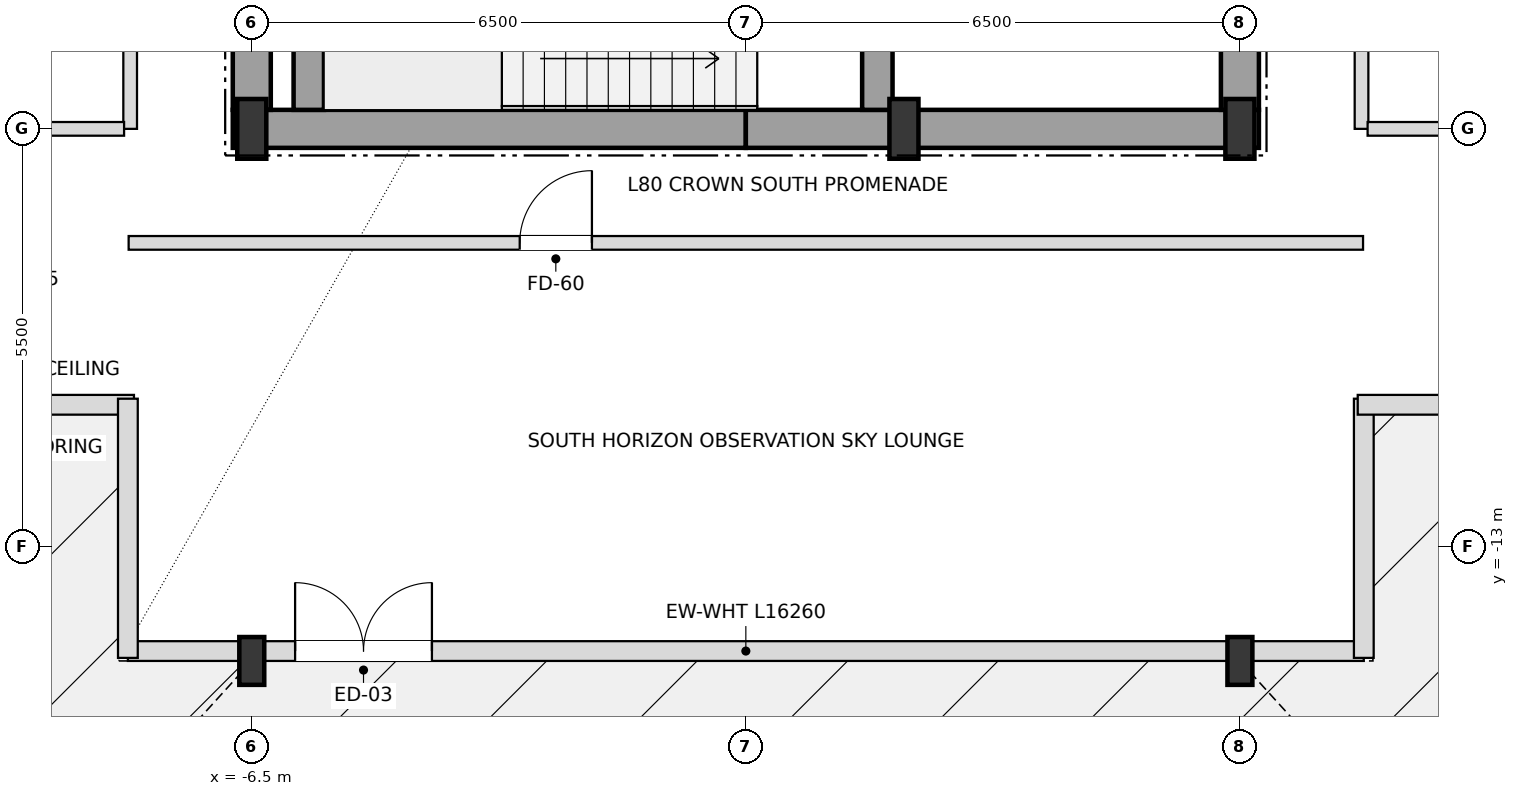
"""IFC4 building model, lengths in metres.
Left out: names, types, materials, properties, quantities, classifications, styles, units other than length and angle.
Written with IfcOpenShell. Run it as: python <this file> out.ifc"""

import sys

from ifc_helpers import new_model, si_unit, direction, frame, frame_2d, origin, origin_2d, place, context, subcontext, project, spatial, rectangle, i_section, extrude, element, fill, save


model = new_model("IFC4")
c1 = context("Model", 3, precision=1e-05, world=origin(), true_north=direction((0.0, 1.0)))
c2 = subcontext(c1, "Body", "Model", "MODEL_VIEW")
j1 = project(units=[si_unit("LENGTHUNIT", "METRE"), si_unit("PLANEANGLEUNIT", "RADIAN")], contexts=[c1])
p1 = place(None, origin())
s1 = spatial("IfcSite", under=j1, at=p1, CompositionType="ELEMENT")
p2 = place(p1, origin())
s2 = spatial("IfcBuilding", under=s1, at=p2, CompositionType="ELEMENT")
p3 = place(p2, frame((0.0, 0.0, 305.1)))
s3 = spatial("IfcBuildingStorey", under=s2, at=p3, CompositionType="ELEMENT", Elevation=305.1)
for number, where, z_axis, x_axis in (
    (1, (-6.5, -7.5, 0.0), (0.0, 0.0, 1.0), (1.0, 0.0, 0.0)),
    (2, (2.08, -7.5, 0.0), (0.0, 0.0, 1.0), (1.0, 0.0, 0.0)),
    (3, (6.5, -7.5, 0.0), (0.0, 0.0, 1.0), (1.0, 0.0, 0.0)),
):
    element("IfcColumn", number, at=place(p3, frame(where, z_axis=z_axis, x_axis=x_axis)), inside=s3, PredefinedType="COLUMN", context=c2, shape_type="SweptSolid", body=[
        extrude(i_section(OverallWidth=0.382, OverallDepth=0.786, WebThickness=0.02, FlangeThickness=0.033, at=origin_2d()), origin(), (0.0, 0.0, 1.0), 4.8),
    ])
for number, where, z_axis, x_axis in (
    (4, (-6.5, -14.5, 0.0), (0.0, 0.0, 1.0), (1.0, 0.0, 0.0)),
    (5, (6.5, -14.5, 0.0), (0.0, 0.0, 1.0), (1.0, 0.0, 0.0)),
):
    element("IfcColumn", number, at=place(p3, frame(where, z_axis=z_axis, x_axis=x_axis)), inside=s3, PredefinedType="COLUMN", context=c2, shape_type="SweptSolid", body=[
        extrude(i_section(OverallWidth=0.328, OverallDepth=0.629, WebThickness=0.014, FlangeThickness=0.021, at=origin_2d()), origin(), (0.0, 0.0, 1.0), 4.8),
    ])
p4 = place(p3, frame((-8.13, -14.37, 0.0), z_axis=(0.0, 0.0, 1.0), x_axis=(1.0, 0.0, 0.0)))
e6 = element("IfcWall", 6, at=p4, inside=s3, PredefinedType="SOLIDWALL", context=c2, shape_type="SweptSolid", body=[
    extrude(rectangle(XDim=16.26, YDim=0.26, at=frame_2d((8.13, 0.0))), origin(), (0.0, 0.0, 1.0), 4.218),
])
p5 = place(p4, frame((2.2, 0.0, 0.0)))
e7 = element("IfcOpeningElement", 7, at=p5, cuts=e6, PredefinedType="OPENING", context=c2, shape_type="SweptSolid", body=[
    extrude(rectangle(XDim=1.8, YDim=2.3, at=frame_2d((0.9, 1.15))), frame((0.0, 0.14, 0.0), z_axis=(0.0, -1.0, 0.0), x_axis=(1.0, 0.0, 0.0)), (0.0, 0.0, 1.0), 0.28),
])
p6 = place(p3, frame((-11.46, -11.13, 0.0), z_axis=(0.0, 0.0, 1.0), x_axis=(1.0, 0.0, 0.0)))
e8 = element("IfcWall", 8, at=p6, inside=s3, PredefinedType="SOLIDWALL", context=c2, shape_type="SweptSolid", body=[
    extrude(rectangle(XDim=3.41, YDim=0.26, at=frame_2d((1.705, 0.0))), origin(), (0.0, 0.0, 1.0), 4.55),
])
for number, where, z_axis, x_axis in (
    (9, (-8.13, -11.05, 0.0), (0.0, 0.0, 1.0), (0.0, -1.0, 0.0)),
    (10, (8.13, -14.46, 0.0), (0.0, 0.0, 1.0), (0.0, 1.0, 0.0)),
):
    element("IfcWall", number, at=place(p3, frame(where, z_axis=z_axis, x_axis=x_axis)), inside=s3, PredefinedType="SOLIDWALL", context=c2, shape_type="SweptSolid", body=[
        extrude(rectangle(XDim=3.41, YDim=0.26, at=frame_2d((1.705, 0.0))), origin(), (0.0, 0.0, 1.0), 4.218),
    ])
p7 = place(p3, frame((8.05, -11.13, 0.0), z_axis=(0.0, 0.0, 1.0), x_axis=(1.0, 0.0, 0.0)))
e11 = element("IfcWall", 11, at=p7, inside=s3, PredefinedType="SOLIDWALL", context=c2, shape_type="SweptSolid", body=[
    extrude(rectangle(XDim=3.41, YDim=0.26, at=frame_2d((1.705, 0.0))), origin(), (0.0, 0.0, 1.0), 4.55),
])
for number, where, z_axis, x_axis in (
    (12, (-6.75, -7.5, 0.0), (0.0, 0.0, 1.0), (1.0, 0.0, 0.0)),
    (13, (0.0, -7.5, 0.0), (0.0, 0.0, 1.0), (1.0, 0.0, 0.0)),
):
    element("IfcWall", number, at=place(p3, frame(where, z_axis=z_axis, x_axis=x_axis)), inside=s3, PredefinedType="SHEAR", context=c2, shape_type="SweptSolid", body=[
        extrude(rectangle(XDim=6.75, YDim=0.5, at=frame_2d((3.375, 0.0))), origin(), (0.0, 0.0, 1.0), 4.55),
    ])
p8 = place(p3, frame((-6.5, -7.25, 0.0), z_axis=(0.0, 0.0, 1.0), x_axis=(0.0, 1.0, 0.0)))
e14 = element("IfcWall", 14, at=p8, inside=s3, PredefinedType="SHEAR", context=c2, shape_type="SweptSolid", body=[
    extrude(rectangle(XDim=3.55, YDim=0.5, at=frame_2d((1.775, 0.0))), origin(), (0.0, 0.0, 1.0), 4.55),
])
p9 = place(p3, frame((6.5, -7.25, 0.0), z_axis=(0.0, 0.0, 1.0), x_axis=(0.0, 1.0, 0.0)))
e15 = element("IfcWall", 15, at=p9, inside=s3, PredefinedType="SHEAR", context=c2, shape_type="SweptSolid", body=[
    extrude(rectangle(XDim=5.75, YDim=0.5, at=frame_2d((2.875, 0.0))), origin(), (0.0, 0.0, 1.0), 4.55),
])
p10 = place(p9, frame((0.85, 0.0, 0.0)))
e16 = element("IfcOpeningElement", 16, at=p10, cuts=e15, PredefinedType="OPENING", context=c2, shape_type="SweptSolid", body=[
    extrude(rectangle(XDim=1.05, YDim=2.15, at=frame_2d((0.525, 1.075))), frame((0.0, 0.26, 0.0), z_axis=(0.0, -1.0, 0.0), x_axis=(1.0, 0.0, 0.0)), (0.0, 0.0, 1.0), 0.52),
])
p11 = place(p3, frame((-5.75, -7.25, 0.0), z_axis=(0.0, 0.0, 1.0), x_axis=(0.0, 1.0, 0.0)))
e17 = element("IfcWall", 17, at=p11, inside=s3, PredefinedType="SHEAR", context=c2, shape_type="SweptSolid", body=[
    extrude(rectangle(XDim=2.9, YDim=0.4, at=frame_2d((1.45, 0.0))), origin(), (0.0, 0.0, 1.0), 4.55),
])
p12 = place(p3, frame((1.73, -7.25, 0.0), z_axis=(0.0, 0.0, 1.0), x_axis=(0.0, 1.0, 0.0)))
e18 = element("IfcWall", 18, at=p12, inside=s3, PredefinedType="SHEAR", context=c2, shape_type="SweptSolid", body=[
    extrude(rectangle(XDim=3.3, YDim=0.4, at=frame_2d((1.65, 0.0))), origin(), (0.0, 0.0, 1.0), 4.55),
])
p13 = place(p12, frame((0.9, 0.0, 0.0)))
e19 = element("IfcOpeningElement", 19, at=p13, cuts=e18, PredefinedType="OPENING", context=c2, shape_type="SweptSolid", body=[
    extrude(rectangle(XDim=1.05, YDim=2.15, at=frame_2d((0.525, 1.075))), frame((0.0, 0.21, 0.0), z_axis=(0.0, -1.0, 0.0), x_axis=(1.0, 0.0, 0.0)), (0.0, 0.0, 1.0), 0.42),
])
p14 = place(p3, frame((-8.1, -7.5, 0.0), z_axis=(0.0, 0.0, 1.0), x_axis=(0.0, 1.0, 0.0)))
e20 = element("IfcWall", 20, at=p14, inside=s3, PredefinedType="PARTITIONING", context=c2, shape_type="SweptSolid", body=[
    extrude(rectangle(XDim=15.0, YDim=0.18, at=frame_2d((7.5, 0.0))), origin(), (0.0, 0.0, 1.0), 4.55),
])
p15 = place(p14, frame((4.525, 0.0, 0.0)))
e21 = element("IfcOpeningElement", 21, at=p15, cuts=e20, PredefinedType="OPENING", context=c2, shape_type="SweptSolid", body=[
    extrude(rectangle(XDim=0.95, YDim=2.15, at=frame_2d((0.475, 1.075))), frame((0.0, 0.1, 0.0), z_axis=(0.0, -1.0, 0.0), x_axis=(1.0, 0.0, 0.0)), (0.0, 0.0, 1.0), 0.2),
])
p16 = place(p3, frame((8.1, -7.5, 0.0), z_axis=(0.0, 0.0, 1.0), x_axis=(0.0, 1.0, 0.0)))
e22 = element("IfcWall", 22, at=p16, inside=s3, PredefinedType="PARTITIONING", context=c2, shape_type="SweptSolid", body=[
    extrude(rectangle(XDim=15.0, YDim=0.18, at=frame_2d((7.5, 0.0))), origin(), (0.0, 0.0, 1.0), 4.55),
])
p17 = place(p16, frame((4.525, 0.0, 0.0)))
e23 = element("IfcOpeningElement", 23, at=p17, cuts=e22, PredefinedType="OPENING", context=c2, shape_type="SweptSolid", body=[
    extrude(rectangle(XDim=0.95, YDim=2.15, at=frame_2d((0.475, 1.075))), frame((0.0, 0.1, 0.0), z_axis=(0.0, -1.0, 0.0), x_axis=(1.0, 0.0, 0.0)), (0.0, 0.0, 1.0), 0.2),
])
p18 = place(p16, frame((11.825, 0.0, 0.0)))
e24 = element("IfcOpeningElement", 24, at=p18, cuts=e22, PredefinedType="OPENING", context=c2, shape_type="SweptSolid", body=[
    extrude(rectangle(XDim=0.95, YDim=2.15, at=frame_2d((0.475, 1.075))), frame((0.0, 0.1, 0.0), z_axis=(0.0, -1.0, 0.0), x_axis=(1.0, 0.0, 0.0)), (0.0, 0.0, 1.0), 0.2),
])
p19 = place(p3, frame((-8.12, -9.0, 0.0), z_axis=(0.0, 0.0, 1.0), x_axis=(1.0, 0.0, 0.0)))
e25 = element("IfcWall", 25, at=p19, inside=s3, PredefinedType="PARTITIONING", context=c2, shape_type="SweptSolid", body=[
    extrude(rectangle(XDim=16.24, YDim=0.18, at=frame_2d((8.12, 0.0))), origin(), (0.0, 0.0, 1.0), 4.55),
])
p20 = place(p19, frame((5.145, 0.0, 0.0)))
e26 = element("IfcOpeningElement", 26, at=p20, cuts=e25, PredefinedType="OPENING", context=c2, shape_type="SweptSolid", body=[
    extrude(rectangle(XDim=0.95, YDim=2.15, at=frame_2d((0.475, 1.075))), frame((0.0, 0.1, 0.0), z_axis=(0.0, -1.0, 0.0), x_axis=(1.0, 0.0, 0.0)), (0.0, 0.0, 1.0), 0.2),
])
for number, where, z_axis, x_axis in (
    (27, (-11.25, -7.5, 0.0), (0.0, 0.0, 1.0), (1.0, 0.0, 0.0)),
    (28, (8.18, -7.5, 0.0), (0.0, 0.0, 1.0), (1.0, 0.0, 0.0)),
):
    element("IfcWall", number, at=place(p3, frame(where, z_axis=z_axis, x_axis=x_axis)), inside=s3, PredefinedType="PARTITIONING", context=c2, shape_type="SweptSolid", body=[
        extrude(rectangle(XDim=3.07, YDim=0.18, at=frame_2d((1.535, 0.0))), origin(), (0.0, 0.0, 1.0), 4.218),
    ])
p21 = place(p5, origin())
e29 = element("IfcDoor", 29, at=p21, inside=s3, OperationType="DOUBLE_DOOR_SINGLE_SWING", PredefinedType="DOOR", context=c2, shape_type="SweptSolid", body=[
    extrude(rectangle(XDim=1.8, YDim=2.3, at=frame_2d((0.9, 1.15))), frame((0.0, 0.025, 0.0), z_axis=(0.0, -1.0, 0.0), x_axis=(1.0, 0.0, 0.0)), (0.0, 0.0, 1.0), 0.05),
])
fill(e7, e29)
p22 = place(p20, origin())
e30 = element("IfcDoor", 30, at=p22, inside=s3, OperationType="SINGLE_SWING_RIGHT", PredefinedType="DOOR", context=c2, shape_type="SweptSolid", body=[
    extrude(rectangle(XDim=0.95, YDim=2.15, at=frame_2d((0.475, 1.075))), frame((0.0, 0.025, 0.0), z_axis=(0.0, -1.0, 0.0), x_axis=(1.0, 0.0, 0.0)), (0.0, 0.0, 1.0), 0.05),
])
fill(e26, e30)
save(model, sys.argv[1])
